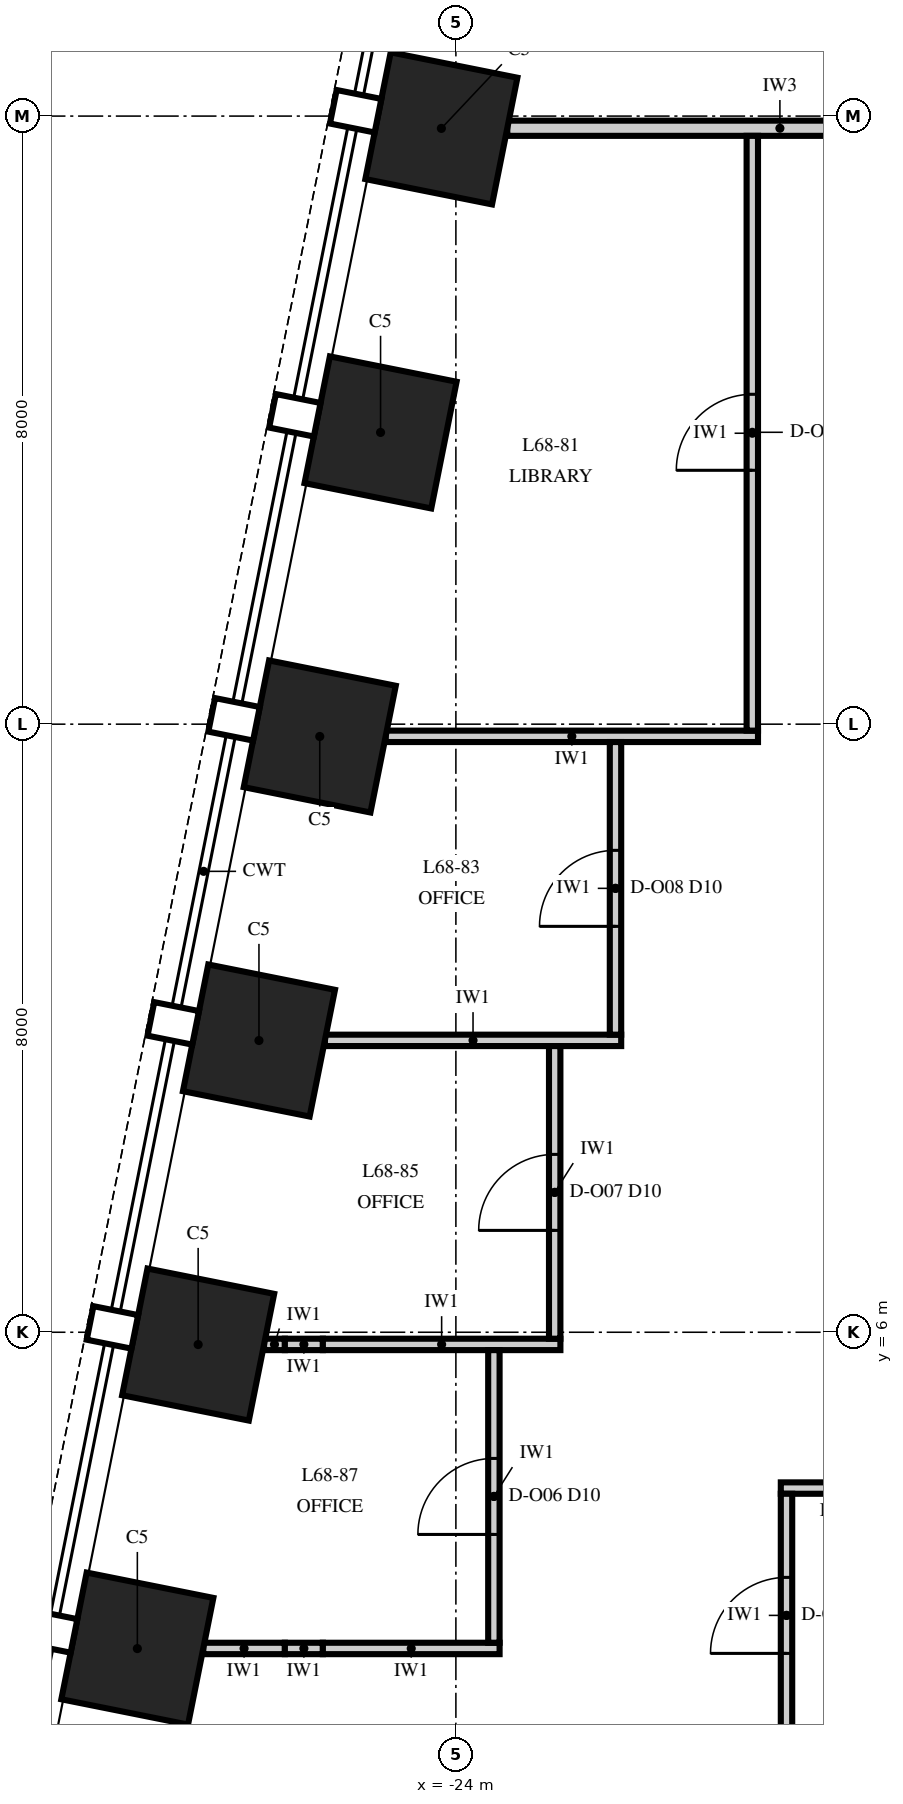
"""IFC4 building model, lengths in metres.
Left out: names, types, materials, properties, quantities, classifications, styles, units other than length and angle.
Written with IfcOpenShell. Run it as: python <this file> out.ifc"""

import sys

from ifc_helpers import new_model, si_unit, direction, frame, frame_2d, origin, origin_2d, place, context, subcontext, project, spatial, rectangle, extrude, element, fill, save


model = new_model("IFC4")
c1 = context("Model", 3, precision=1e-05, world=origin(), true_north=direction((0.0, 1.0)))
c2 = subcontext(c1, "Body", "Model", "MODEL_VIEW")
j1 = project(units=[si_unit("LENGTHUNIT", "METRE"), si_unit("PLANEANGLEUNIT", "RADIAN")], contexts=[c1])
p1 = place(None, origin())
s1 = spatial("IfcSite", under=j1, at=p1, CompositionType="ELEMENT")
p2 = place(p1, origin())
s2 = spatial("IfcBuilding", under=s1, at=p2, CompositionType="ELEMENT")
p3 = place(p2, frame((0.0, 0.0, 292.0)))
s3 = spatial("IfcBuildingStorey", under=s2, at=p3, CompositionType="ELEMENT", Elevation=292.0)
for number, where, z_axis, x_axis in (
    (1, (-24.191, 21.838, 0.0), (0.0, 0.0, 1.0), (-0.196, -0.981, 0.0)),
    (2, (-24.991, 17.838, 0.0), (0.0, 0.0, 1.0), (-0.196, -0.981, 0.0)),
    (3, (-25.791, 13.838, 0.0), (0.0, 0.0, 1.0), (-0.196, -0.981, 0.0)),
    (4, (-26.591, 9.838, 0.0), (0.0, 0.0, 1.0), (-0.196, -0.981, 0.0)),
    (5, (-27.391, 5.838, 0.0), (0.0, 0.0, 1.0), (-0.196, -0.981, 0.0)),
    (6, (-28.191, 1.838, 0.0), (0.0, 0.0, 1.0), (-0.196, -0.981, 0.0)),
):
    element("IfcColumn", number, at=place(p3, frame(where, z_axis=z_axis, x_axis=x_axis)), inside=s3, PredefinedType="COLUMN", context=c2, shape_type="SweptSolid", body=[
        extrude(rectangle(XDim=1.7, YDim=1.7, at=origin_2d()), origin(), (0.0, 0.0, 1.0), 4.0),
    ])
p4 = place(p3, frame((-27.324, 1.84, 0.0), z_axis=(0.0, 0.0, 1.0), x_axis=(1.0, 0.0, 0.0)))
e7 = element("IfcWall", 7, at=p4, inside=s3, PredefinedType="PARTITIONING", context=c2, shape_type="SweptSolid", body=[
    extrude(rectangle(XDim=1.074, YDim=0.15, at=frame_2d((0.537, 0.0))), origin(), (0.0, 0.0, 1.0), 3.326),
])
p5 = place(p3, frame((-26.25, 1.84, 0.0), z_axis=(0.0, 0.0, 1.0), x_axis=(1.0, 0.0, 0.0)))
e8 = element("IfcWall", 8, at=p5, inside=s3, PredefinedType="PARTITIONING", context=c2, shape_type="SweptSolid", body=[
    extrude(rectangle(XDim=0.5, YDim=0.15, at=frame_2d((0.25, 0.0))), origin(), (0.0, 0.0, 1.0), 2.15),
])
p6 = place(p3, frame((-25.75, 1.84, 0.0), z_axis=(0.0, 0.0, 1.0), x_axis=(1.0, 0.0, 0.0)))
e9 = element("IfcWall", 9, at=p6, inside=s3, PredefinedType="PARTITIONING", context=c2, shape_type="SweptSolid", body=[
    extrude(rectangle(XDim=2.325, YDim=0.15, at=frame_2d((1.163, 0.0))), origin(), (0.0, 0.0, 1.0), 3.326),
])
p7 = place(p3, frame((-19.725, 3.95, 0.0), z_axis=(0.0, 0.0, 1.0), x_axis=(1.0, 0.0, 0.0)))
e10 = element("IfcWall", 10, at=p7, inside=s3, PredefinedType="PARTITIONING", context=c2, shape_type="SweptSolid", body=[
    extrude(rectangle(XDim=1.475, YDim=0.15, at=frame_2d((0.738, 0.0))), origin(), (0.0, 0.0, 1.0), 3.85),
])
p8 = place(p3, frame((-26.524, 5.84, 0.0), z_axis=(0.0, 0.0, 1.0), x_axis=(1.0, 0.0, 0.0)))
e11 = element("IfcWall", 11, at=p8, inside=s3, PredefinedType="PARTITIONING", context=c2, shape_type="SweptSolid", body=[
    extrude(rectangle(XDim=0.274, YDim=0.15, at=frame_2d((0.137, 0.0))), origin(), (0.0, 0.0, 1.0), 2.842),
])
p9 = place(p3, frame((-26.25, 5.84, 0.0), z_axis=(0.0, 0.0, 1.0), x_axis=(1.0, 0.0, 0.0)))
e12 = element("IfcWall", 12, at=p9, inside=s3, PredefinedType="PARTITIONING", context=c2, shape_type="SweptSolid", body=[
    extrude(rectangle(XDim=0.5, YDim=0.15, at=frame_2d((0.25, 0.0))), origin(), (0.0, 0.0, 1.0), 2.15),
])
p10 = place(p3, frame((-25.75, 5.84, 0.0), z_axis=(0.0, 0.0, 1.0), x_axis=(1.0, 0.0, 0.0)))
e13 = element("IfcWall", 13, at=p10, inside=s3, PredefinedType="PARTITIONING", context=c2, shape_type="SweptSolid", body=[
    extrude(rectangle(XDim=3.125, YDim=0.15, at=frame_2d((1.562, 0.0))), origin(), (0.0, 0.0, 1.0), 2.842),
])
p11 = place(p3, frame((-25.724, 9.84, 0.0), z_axis=(0.0, 0.0, 1.0), x_axis=(1.0, 0.0, 0.0)))
e14 = element("IfcWall", 14, at=p11, inside=s3, PredefinedType="PARTITIONING", context=c2, shape_type="SweptSolid", body=[
    extrude(rectangle(XDim=3.899, YDim=0.15, at=frame_2d((1.949, 0.0))), origin(), (0.0, 0.0, 1.0), 3.23),
])
p12 = place(p3, frame((-24.924, 13.84, 0.0), z_axis=(0.0, 0.0, 1.0), x_axis=(1.0, 0.0, 0.0)))
e15 = element("IfcWall", 15, at=p12, inside=s3, PredefinedType="PARTITIONING", context=c2, shape_type="SweptSolid", body=[
    extrude(rectangle(XDim=4.899, YDim=0.15, at=frame_2d((2.449, 0.0))), origin(), (0.0, 0.0, 1.0), 3.23),
])
p13 = place(p3, frame((-23.324, 21.84, 0.0), z_axis=(0.0, 0.0, 1.0), x_axis=(1.0, 0.0, 0.0)))
e16 = element("IfcWall", 16, at=p13, inside=s3, PredefinedType="PARTITIONING", context=c2, shape_type="SweptSolid", body=[
    extrude(rectangle(XDim=7.174, YDim=0.2, at=frame_2d((3.587, 0.0))), origin(), (0.0, 0.0, 1.0), 3.23),
])
p14 = place(p3, frame((-23.5, 1.915, 0.0), z_axis=(0.0, 0.0, 1.0), x_axis=(0.0, 1.0, 0.0)))
e17 = element("IfcWall", 17, at=p14, inside=s3, PredefinedType="PARTITIONING", context=c2, shape_type="SweptSolid", body=[
    extrude(rectangle(XDim=3.85, YDim=0.15, at=frame_2d((1.925, 0.0))), origin(), (0.0, 0.0, 1.0), 3.85),
])
p15 = place(p14, frame((1.425, 0.0, 0.0)))
e18 = element("IfcOpeningElement", 18, at=p15, cuts=e17, PredefinedType="OPENING", context=c2, shape_type="SweptSolid", body=[
    extrude(rectangle(XDim=1.0, YDim=2.3, at=frame_2d((0.5, 1.15))), frame((0.0, 0.09, 0.0), z_axis=(0.0, -1.0, 0.0), x_axis=(1.0, 0.0, 0.0)), (0.0, 0.0, 1.0), 0.18),
])
p16 = place(p3, frame((-22.7, 5.915, 0.0), z_axis=(0.0, 0.0, 1.0), x_axis=(0.0, 1.0, 0.0)))
e19 = element("IfcWall", 19, at=p16, inside=s3, PredefinedType="PARTITIONING", context=c2, shape_type="SweptSolid", body=[
    extrude(rectangle(XDim=3.85, YDim=0.15, at=frame_2d((1.925, 0.0))), origin(), (0.0, 0.0, 1.0), 2.842),
])
p17 = place(p16, frame((1.425, 0.0, 0.0)))
e20 = element("IfcOpeningElement", 20, at=p17, cuts=e19, PredefinedType="OPENING", context=c2, shape_type="SweptSolid", body=[
    extrude(rectangle(XDim=1.0, YDim=2.3, at=frame_2d((0.5, 1.15))), frame((0.0, 0.09, 0.0), z_axis=(0.0, -1.0, 0.0), x_axis=(1.0, 0.0, 0.0)), (0.0, 0.0, 1.0), 0.18),
])
p18 = place(p3, frame((-21.9, 9.915, 0.0), z_axis=(0.0, 0.0, 1.0), x_axis=(0.0, 1.0, 0.0)))
e21 = element("IfcWall", 21, at=p18, inside=s3, PredefinedType="PARTITIONING", context=c2, shape_type="SweptSolid", body=[
    extrude(rectangle(XDim=3.85, YDim=0.15, at=frame_2d((1.925, 0.0))), origin(), (0.0, 0.0, 1.0), 3.85),
])
p19 = place(p18, frame((1.425, 0.0, 0.0)))
e22 = element("IfcOpeningElement", 22, at=p19, cuts=e21, PredefinedType="OPENING", context=c2, shape_type="SweptSolid", body=[
    extrude(rectangle(XDim=1.0, YDim=2.3, at=frame_2d((0.5, 1.15))), frame((0.0, 0.09, 0.0), z_axis=(0.0, -1.0, 0.0), x_axis=(1.0, 0.0, 0.0)), (0.0, 0.0, 1.0), 0.18),
])
p20 = place(p3, frame((-20.1, 13.915, 0.0), z_axis=(0.0, 0.0, 1.0), x_axis=(0.0, 1.0, 0.0)))
e23 = element("IfcWall", 23, at=p20, inside=s3, PredefinedType="PARTITIONING", context=c2, shape_type="SweptSolid", body=[
    extrude(rectangle(XDim=7.825, YDim=0.15, at=frame_2d((3.913, 0.0))), origin(), (0.0, 0.0, 1.0), 3.23),
])
p21 = place(p20, frame((3.425, 0.0, 0.0)))
e24 = element("IfcOpeningElement", 24, at=p21, cuts=e23, PredefinedType="OPENING", context=c2, shape_type="SweptSolid", body=[
    extrude(rectangle(XDim=1.0, YDim=2.3, at=frame_2d((0.5, 1.15))), frame((0.0, 0.09, 0.0), z_axis=(0.0, -1.0, 0.0), x_axis=(1.0, 0.0, 0.0)), (0.0, 0.0, 1.0), 0.18),
])
p22 = place(p3, frame((-19.65, 0.675, 0.0), z_axis=(0.0, 0.0, 1.0), x_axis=(0.0, 1.0, 0.0)))
e25 = element("IfcWall", 25, at=p22, inside=s3, PredefinedType="PARTITIONING", context=c2, shape_type="SweptSolid", body=[
    extrude(rectangle(XDim=3.2, YDim=0.15, at=frame_2d((1.6, 0.0))), origin(), (0.0, 0.0, 1.0), 3.85),
])
p23 = place(p22, frame((1.1, 0.0, 0.0)))
e26 = element("IfcOpeningElement", 26, at=p23, cuts=e25, PredefinedType="OPENING", context=c2, shape_type="SweptSolid", body=[
    extrude(rectangle(XDim=1.0, YDim=2.3, at=frame_2d((0.5, 1.15))), frame((0.0, 0.09, 0.0), z_axis=(0.0, -1.0, 0.0), x_axis=(1.0, 0.0, 0.0)), (0.0, 0.0, 1.0), 0.18),
])
p24 = place(p15, origin())
e27 = element("IfcDoor", 27, at=p24, inside=s3, OperationType="SINGLE_SWING_LEFT", PredefinedType="DOOR", context=c2, shape_type="SweptSolid", body=[
    extrude(rectangle(XDim=1.0, YDim=2.3, at=frame_2d((0.5, 1.15))), frame((0.0, 0.075, 0.0), z_axis=(0.0, -1.0, 0.0), x_axis=(1.0, 0.0, 0.0)), (0.0, 0.0, 1.0), 0.149),
])
fill(e18, e27)
p25 = place(p17, origin())
e28 = element("IfcDoor", 28, at=p25, inside=s3, OperationType="SINGLE_SWING_LEFT", PredefinedType="DOOR", context=c2, shape_type="SweptSolid", body=[
    extrude(rectangle(XDim=1.0, YDim=2.3, at=frame_2d((0.5, 1.15))), frame((0.0, 0.075, 0.0), z_axis=(0.0, -1.0, 0.0), x_axis=(1.0, 0.0, 0.0)), (0.0, 0.0, 1.0), 0.149),
])
fill(e20, e28)
p26 = place(p19, origin())
e29 = element("IfcDoor", 29, at=p26, inside=s3, OperationType="SINGLE_SWING_LEFT", PredefinedType="DOOR", context=c2, shape_type="SweptSolid", body=[
    extrude(rectangle(XDim=1.0, YDim=2.3, at=frame_2d((0.5, 1.15))), frame((0.0, 0.075, 0.0), z_axis=(0.0, -1.0, 0.0), x_axis=(1.0, 0.0, 0.0)), (0.0, 0.0, 1.0), 0.149),
])
fill(e22, e29)
p27 = place(p21, origin())
e30 = element("IfcDoor", 30, at=p27, inside=s3, OperationType="SINGLE_SWING_LEFT", PredefinedType="DOOR", context=c2, shape_type="SweptSolid", body=[
    extrude(rectangle(XDim=1.0, YDim=2.3, at=frame_2d((0.5, 1.15))), frame((0.0, 0.075, 0.0), z_axis=(0.0, -1.0, 0.0), x_axis=(1.0, 0.0, 0.0)), (0.0, 0.0, 1.0), 0.149),
])
fill(e24, e30)
p28 = place(p23, origin())
e31 = element("IfcDoor", 31, at=p28, inside=s3, OperationType="SINGLE_SWING_LEFT", PredefinedType="DOOR", context=c2, shape_type="SweptSolid", body=[
    extrude(rectangle(XDim=1.0, YDim=2.3, at=frame_2d((0.5, 1.15))), frame((0.0, 0.075, 0.0), z_axis=(0.0, -1.0, 0.0), x_axis=(1.0, 0.0, 0.0)), (0.0, 0.0, 1.0), 0.149),
])
fill(e26, e31)
save(model, sys.argv[1])
